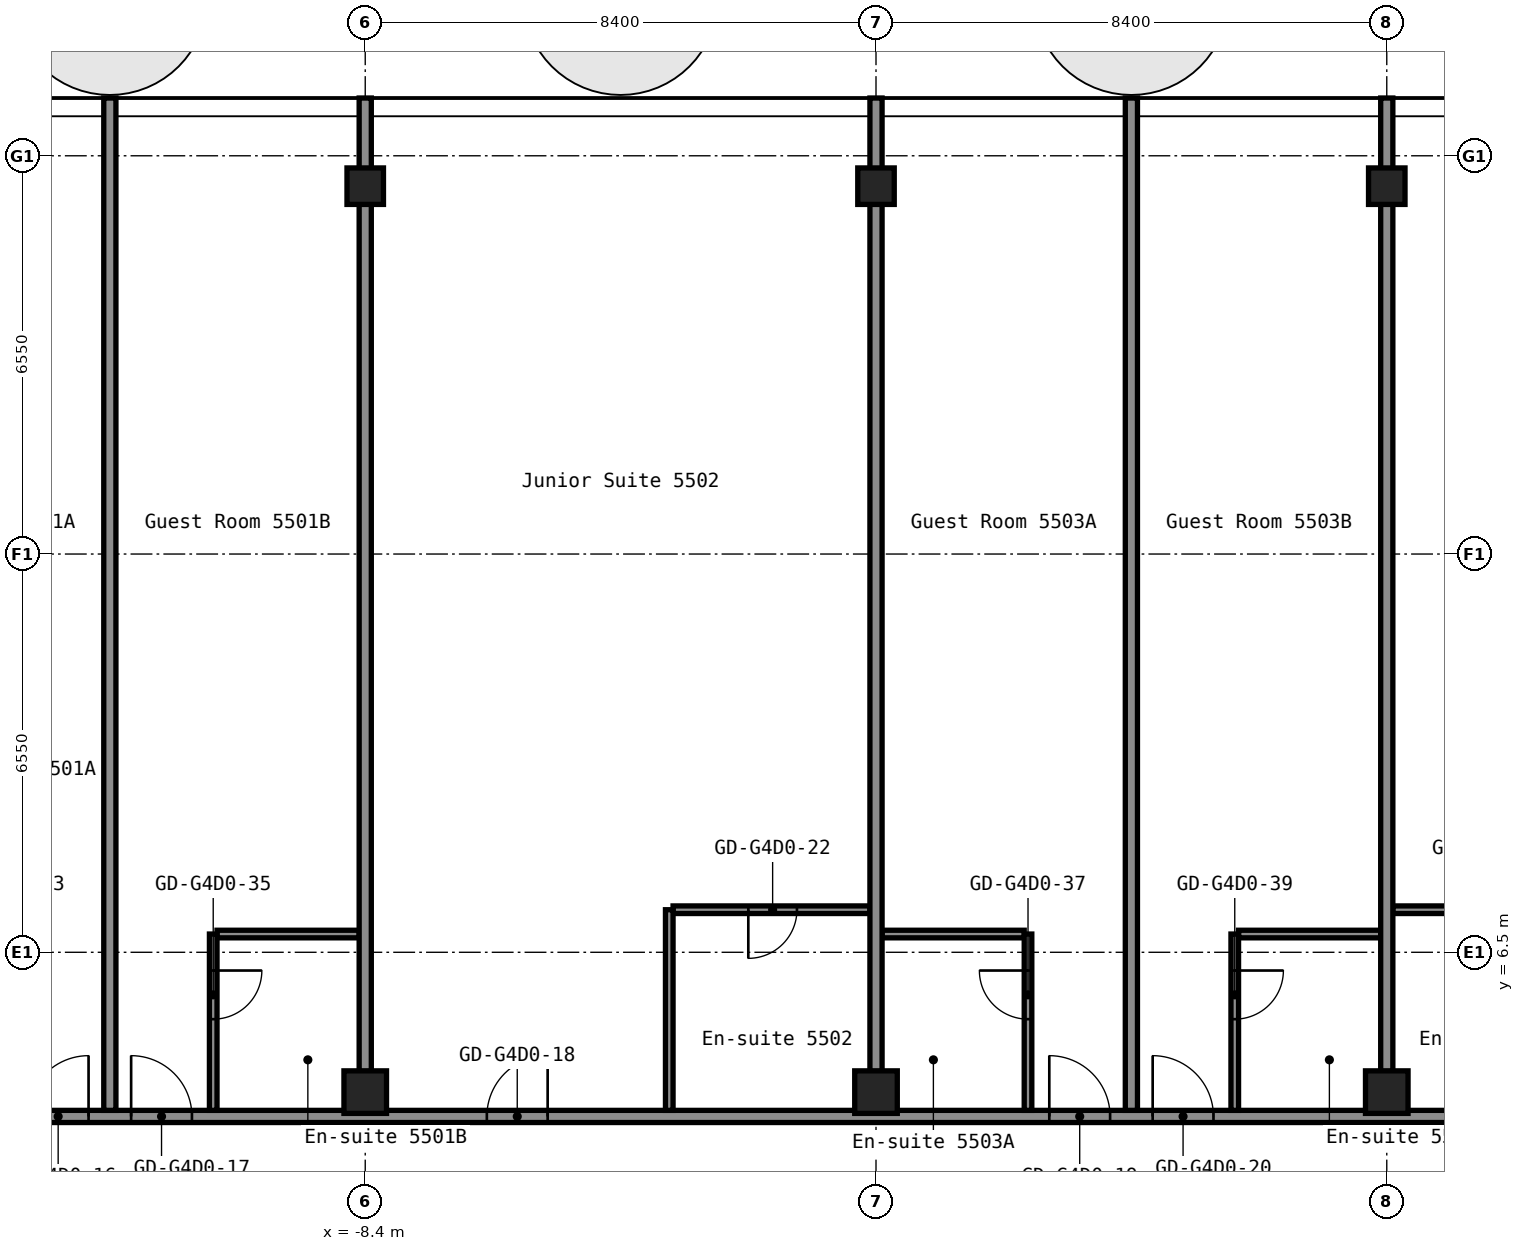
"""IFC4 building model, lengths in metres.
Left out: names, types, materials, properties, quantities, classifications, styles, units other than length and angle.
Written with IfcOpenShell. Run it as: python <this file> out.ifc"""

import sys

from ifc_helpers import new_model, si_unit, direction, frame, frame_2d, origin, origin_2d, place, context, subcontext, project, spatial, rectangle, hollow_rectangle, extrude, element, fill, save


model = new_model("IFC4")
c1 = context("Model", 3, precision=1e-05, world=origin(), true_north=direction((0.0, 1.0)))
c2 = subcontext(c1, "Body", "Model", "MODEL_VIEW")
j1 = project(units=[si_unit("LENGTHUNIT", "METRE"), si_unit("PLANEANGLEUNIT", "RADIAN")], contexts=[c1])
p1 = place(None, origin())
s1 = spatial("IfcSite", under=j1, at=p1, CompositionType="ELEMENT")
p2 = place(p1, origin())
s2 = spatial("IfcBuilding", under=s1, at=p2, CompositionType="ELEMENT")
p3 = place(p2, frame((0.0, 0.0, 196.2)))
s3 = spatial("IfcBuildingStorey", under=s2, at=p3, CompositionType="ELEMENT", Elevation=196.2)
p4 = place(p3, frame((-8.4, 4.2, 0.0), z_axis=(0.0, 0.0, 1.0), x_axis=(1.0, 0.0, 0.0)))
e1 = element("IfcColumn", 1, at=p4, inside=s3, PredefinedType="COLUMN", context=c2, shape_type="SweptSolid", body=[
    extrude(hollow_rectangle(XDim=0.7, YDim=0.7, WallThickness=0.028, at=origin_2d()), origin(), (0.0, 0.0, 1.0), 2.75),
])
p5 = place(p3, frame((-8.4, 19.1, 0.0), z_axis=(0.0, 0.0, 1.0), x_axis=(1.0, 0.0, 0.0)))
e2 = element("IfcColumn", 2, at=p5, inside=s3, PredefinedType="COLUMN", context=c2, shape_type="SweptSolid", body=[
    extrude(hollow_rectangle(XDim=0.6, YDim=0.6, WallThickness=0.025, InnerFilletRadius=0.038, OuterFilletRadius=0.062, at=origin_2d()), origin(), (0.0, 0.0, 1.0), 2.75),
])
p6 = place(p3, frame((0.0, 4.2, 0.0), z_axis=(0.0, 0.0, 1.0), x_axis=(1.0, 0.0, 0.0)))
e3 = element("IfcColumn", 3, at=p6, inside=s3, PredefinedType="COLUMN", context=c2, shape_type="SweptSolid", body=[
    extrude(hollow_rectangle(XDim=0.7, YDim=0.7, WallThickness=0.028, at=origin_2d()), origin(), (0.0, 0.0, 1.0), 2.75),
])
p7 = place(p3, frame((0.0, 19.1, 0.0), z_axis=(0.0, 0.0, 1.0), x_axis=(1.0, 0.0, 0.0)))
e4 = element("IfcColumn", 4, at=p7, inside=s3, PredefinedType="COLUMN", context=c2, shape_type="SweptSolid", body=[
    extrude(hollow_rectangle(XDim=0.6, YDim=0.6, WallThickness=0.025, InnerFilletRadius=0.038, OuterFilletRadius=0.062, at=origin_2d()), origin(), (0.0, 0.0, 1.0), 2.75),
])
p8 = place(p3, frame((8.4, 4.2, 0.0), z_axis=(0.0, 0.0, 1.0), x_axis=(1.0, 0.0, 0.0)))
e5 = element("IfcColumn", 5, at=p8, inside=s3, PredefinedType="COLUMN", context=c2, shape_type="SweptSolid", body=[
    extrude(hollow_rectangle(XDim=0.7, YDim=0.7, WallThickness=0.028, at=origin_2d()), origin(), (0.0, 0.0, 1.0), 2.75),
])
p9 = place(p3, frame((8.4, 19.1, 0.0), z_axis=(0.0, 0.0, 1.0), x_axis=(1.0, 0.0, 0.0)))
e6 = element("IfcColumn", 6, at=p9, inside=s3, PredefinedType="COLUMN", context=c2, shape_type="SweptSolid", body=[
    extrude(hollow_rectangle(XDim=0.6, YDim=0.6, WallThickness=0.025, InnerFilletRadius=0.038, OuterFilletRadius=0.062, at=origin_2d()), origin(), (0.0, 0.0, 1.0), 2.75),
])
p10 = place(p3, frame((-16.8, 3.8, 0.0), z_axis=(0.0, 0.0, 1.0), x_axis=(1.0, 0.0, 0.0)))
e7 = element("IfcWall", 7, at=p10, inside=s3, PredefinedType="PARTITIONING", context=c2, shape_type="SweptSolid", body=[
    extrude(rectangle(XDim=33.6, YDim=0.2, at=frame_2d((16.8, 0.0))), origin(), (0.0, 0.0, 1.0), 2.75),
])
p11 = place(p10, frame((2.85, 0.0, 0.0)))
e8 = element("IfcOpeningElement", 8, at=p11, cuts=e7, PredefinedType="OPENING", context=c2, shape_type="SweptSolid", body=[
    extrude(rectangle(XDim=1.0, YDim=2.1, at=frame_2d((0.5, 1.05))), frame((0.0, 0.11, 0.0), z_axis=(0.0, -1.0, 0.0), x_axis=(1.0, 0.0, 0.0)), (0.0, 0.0, 1.0), 0.22),
])
p12 = place(p10, frame((4.55, 0.0, 0.0)))
e9 = element("IfcOpeningElement", 9, at=p12, cuts=e7, PredefinedType="OPENING", context=c2, shape_type="SweptSolid", body=[
    extrude(rectangle(XDim=1.0, YDim=2.1, at=frame_2d((0.5, 1.05))), frame((0.0, 0.11, 0.0), z_axis=(0.0, -1.0, 0.0), x_axis=(1.0, 0.0, 0.0)), (0.0, 0.0, 1.0), 0.22),
])
p13 = place(p10, frame((10.4, 0.0, 0.0)))
e10 = element("IfcOpeningElement", 10, at=p13, cuts=e7, PredefinedType="OPENING", context=c2, shape_type="SweptSolid", body=[
    extrude(rectangle(XDim=1.0, YDim=2.1, at=frame_2d((0.5, 1.05))), frame((0.0, 0.11, 0.0), z_axis=(0.0, -1.0, 0.0), x_axis=(1.0, 0.0, 0.0)), (0.0, 0.0, 1.0), 0.22),
])
p14 = place(p10, frame((19.65, 0.0, 0.0)))
e11 = element("IfcOpeningElement", 11, at=p14, cuts=e7, PredefinedType="OPENING", context=c2, shape_type="SweptSolid", body=[
    extrude(rectangle(XDim=1.0, YDim=2.1, at=frame_2d((0.5, 1.05))), frame((0.0, 0.11, 0.0), z_axis=(0.0, -1.0, 0.0), x_axis=(1.0, 0.0, 0.0)), (0.0, 0.0, 1.0), 0.22),
])
p15 = place(p10, frame((21.35, 0.0, 0.0)))
e12 = element("IfcOpeningElement", 12, at=p15, cuts=e7, PredefinedType="OPENING", context=c2, shape_type="SweptSolid", body=[
    extrude(rectangle(XDim=1.0, YDim=2.1, at=frame_2d((0.5, 1.05))), frame((0.0, 0.11, 0.0), z_axis=(0.0, -1.0, 0.0), x_axis=(1.0, 0.0, 0.0)), (0.0, 0.0, 1.0), 0.22),
])
p16 = place(p10, frame((30.6, 0.0, 0.0)))
e13 = element("IfcOpeningElement", 13, at=p16, cuts=e7, PredefinedType="OPENING", context=c2, shape_type="SweptSolid", body=[
    extrude(rectangle(XDim=1.0, YDim=2.1, at=frame_2d((0.5, 1.05))), frame((0.0, 0.11, 0.0), z_axis=(0.0, -1.0, 0.0), x_axis=(1.0, 0.0, 0.0)), (0.0, 0.0, 1.0), 0.22),
])
for number, where, z_axis, x_axis in (
    (14, (-10.837, 6.8, 0.0), (0.0, 0.0, 1.0), (1.0, 0.0, 0.0)),
    (15, (0.1, 6.8, 0.0), (0.0, 0.0, 1.0), (1.0, 0.0, 0.0)),
):
    element("IfcWall", number, at=place(p3, frame(where, z_axis=z_axis, x_axis=x_axis)), inside=s3, PredefinedType="PARTITIONING", context=c2, shape_type="SweptSolid", body=[
        extrude(rectangle(XDim=2.337, YDim=0.125, at=frame_2d((1.169, 0.0))), origin(), (0.0, 0.0, 1.0), 2.75),
    ])
p17 = place(p3, frame((5.962, 6.8, 0.0), z_axis=(0.0, 0.0, 1.0), x_axis=(1.0, 0.0, 0.0)))
e16 = element("IfcWall", 16, at=p17, inside=s3, PredefinedType="PARTITIONING", context=c2, shape_type="SweptSolid", body=[
    extrude(rectangle(XDim=2.338, YDim=0.125, at=frame_2d((1.169, 0.0))), origin(), (0.0, 0.0, 1.0), 2.75),
])
p18 = place(p3, frame((-3.337, 7.2, 0.0), z_axis=(0.0, 0.0, 1.0), x_axis=(1.0, 0.0, 0.0)))
e17 = element("IfcWall", 17, at=p18, inside=s3, PredefinedType="PARTITIONING", context=c2, shape_type="SweptSolid", body=[
    extrude(rectangle(XDim=3.237, YDim=0.125, at=frame_2d((1.619, 0.0))), origin(), (0.0, 0.0, 1.0), 2.75),
])
p19 = place(p18, frame((1.238, 0.0, 0.0)))
e18 = element("IfcOpeningElement", 18, at=p19, cuts=e17, PredefinedType="OPENING", context=c2, shape_type="SweptSolid", body=[
    extrude(rectangle(XDim=0.8, YDim=2.1, at=frame_2d((0.4, 1.05))), frame((0.0, 0.073, 0.0), z_axis=(0.0, -1.0, 0.0), x_axis=(1.0, 0.0, 0.0)), (0.0, 0.0, 1.0), 0.145),
])
p20 = place(p3, frame((8.5, 7.2, 0.0), z_axis=(0.0, 0.0, 1.0), x_axis=(1.0, 0.0, 0.0)))
e19 = element("IfcWall", 19, at=p20, inside=s3, PredefinedType="PARTITIONING", context=c2, shape_type="SweptSolid", body=[
    extrude(rectangle(XDim=3.238, YDim=0.125, at=frame_2d((1.619, 0.0))), origin(), (0.0, 0.0, 1.0), 2.75),
])
p21 = place(p20, frame((1.2, 0.0, 0.0)))
e20 = element("IfcOpeningElement", 20, at=p21, cuts=e19, PredefinedType="OPENING", context=c2, shape_type="SweptSolid", body=[
    extrude(rectangle(XDim=0.8, YDim=2.1, at=frame_2d((0.4, 1.05))), frame((0.0, 0.073, 0.0), z_axis=(0.0, -1.0, 0.0), x_axis=(1.0, 0.0, 0.0)), (0.0, 0.0, 1.0), 0.145),
])
p22 = place(p3, frame((-12.6, 3.9, 0.0), z_axis=(0.0, 0.0, 1.0), x_axis=(0.0, 1.0, 0.0)))
e21 = element("IfcWall", 21, at=p22, inside=s3, PredefinedType="PARTITIONING", context=c2, shape_type="SweptSolid", body=[
    extrude(rectangle(XDim=16.65, YDim=0.2, at=frame_2d((8.325, 0.0))), origin(), (0.0, 0.0, 1.0), 2.75),
])
p23 = place(p3, frame((-10.9, 3.9, 0.0), z_axis=(0.0, 0.0, 1.0), x_axis=(0.0, 1.0, 0.0)))
e22 = element("IfcWall", 22, at=p23, inside=s3, PredefinedType="PARTITIONING", context=c2, shape_type="SweptSolid", body=[
    extrude(rectangle(XDim=2.9, YDim=0.125, at=frame_2d((1.45, 0.0))), origin(), (0.0, 0.0, 1.0), 2.75),
])
p24 = place(p23, frame((1.5, 0.0, 0.0)))
e23 = element("IfcOpeningElement", 23, at=p24, cuts=e22, PredefinedType="OPENING", context=c2, shape_type="SweptSolid", body=[
    extrude(rectangle(XDim=0.8, YDim=2.1, at=frame_2d((0.4, 1.05))), frame((0.0, 0.073, 0.0), z_axis=(0.0, -1.0, 0.0), x_axis=(1.0, 0.0, 0.0)), (0.0, 0.0, 1.0), 0.145),
])
p25 = place(p3, frame((-8.4, 4.54, 0.0), z_axis=(0.0, 0.0, 1.0), x_axis=(0.0, 1.0, 0.0)))
e24 = element("IfcWall", 24, at=p25, inside=s3, PredefinedType="PARTITIONING", context=c2, shape_type="SweptSolid", body=[
    extrude(rectangle(XDim=16.01, YDim=0.2, at=frame_2d((8.005, 0.0))), origin(), (0.0, 0.0, 1.0), 2.75),
])
p26 = place(p3, frame((-3.4, 3.9, 0.0), z_axis=(0.0, 0.0, 1.0), x_axis=(0.0, 1.0, 0.0)))
e25 = element("IfcWall", 25, at=p26, inside=s3, PredefinedType="PARTITIONING", context=c2, shape_type="SweptSolid", body=[
    extrude(rectangle(XDim=3.3, YDim=0.125, at=frame_2d((1.65, 0.0))), origin(), (0.0, 0.0, 1.0), 2.75),
])
p27 = place(p3, frame((0.0, 4.54, 0.0), z_axis=(0.0, 0.0, 1.0), x_axis=(0.0, 1.0, 0.0)))
e26 = element("IfcWall", 26, at=p27, inside=s3, PredefinedType="PARTITIONING", context=c2, shape_type="SweptSolid", body=[
    extrude(rectangle(XDim=16.01, YDim=0.2, at=frame_2d((8.005, 0.0))), origin(), (0.0, 0.0, 1.0), 2.75),
])
p28 = place(p3, frame((2.5, 3.9, 0.0), z_axis=(0.0, 0.0, 1.0), x_axis=(0.0, 1.0, 0.0)))
e27 = element("IfcWall", 27, at=p28, inside=s3, PredefinedType="PARTITIONING", context=c2, shape_type="SweptSolid", body=[
    extrude(rectangle(XDim=2.9, YDim=0.125, at=frame_2d((1.45, 0.0))), origin(), (0.0, 0.0, 1.0), 2.75),
])
p29 = place(p28, frame((1.5, 0.0, 0.0)))
e28 = element("IfcOpeningElement", 28, at=p29, cuts=e27, PredefinedType="OPENING", context=c2, shape_type="SweptSolid", body=[
    extrude(rectangle(XDim=0.8, YDim=2.1, at=frame_2d((0.4, 1.05))), frame((0.0, 0.073, 0.0), z_axis=(0.0, -1.0, 0.0), x_axis=(1.0, 0.0, 0.0)), (0.0, 0.0, 1.0), 0.145),
])
p30 = place(p3, frame((4.2, 3.9, 0.0), z_axis=(0.0, 0.0, 1.0), x_axis=(0.0, 1.0, 0.0)))
e29 = element("IfcWall", 29, at=p30, inside=s3, PredefinedType="PARTITIONING", context=c2, shape_type="SweptSolid", body=[
    extrude(rectangle(XDim=16.65, YDim=0.2, at=frame_2d((8.325, 0.0))), origin(), (0.0, 0.0, 1.0), 2.75),
])
p31 = place(p3, frame((5.9, 3.9, 0.0), z_axis=(0.0, 0.0, 1.0), x_axis=(0.0, 1.0, 0.0)))
e30 = element("IfcWall", 30, at=p31, inside=s3, PredefinedType="PARTITIONING", context=c2, shape_type="SweptSolid", body=[
    extrude(rectangle(XDim=2.9, YDim=0.125, at=frame_2d((1.45, 0.0))), origin(), (0.0, 0.0, 1.0), 2.75),
])
p32 = place(p31, frame((1.5, 0.0, 0.0)))
e31 = element("IfcOpeningElement", 31, at=p32, cuts=e30, PredefinedType="OPENING", context=c2, shape_type="SweptSolid", body=[
    extrude(rectangle(XDim=0.8, YDim=2.1, at=frame_2d((0.4, 1.05))), frame((0.0, 0.073, 0.0), z_axis=(0.0, -1.0, 0.0), x_axis=(1.0, 0.0, 0.0)), (0.0, 0.0, 1.0), 0.145),
])
p33 = place(p3, frame((8.4, 4.54, 0.0), z_axis=(0.0, 0.0, 1.0), x_axis=(0.0, 1.0, 0.0)))
e32 = element("IfcWall", 32, at=p33, inside=s3, PredefinedType="PARTITIONING", context=c2, shape_type="SweptSolid", body=[
    extrude(rectangle(XDim=16.01, YDim=0.2, at=frame_2d((8.005, 0.0))), origin(), (0.0, 0.0, 1.0), 2.75),
])
p34 = place(p11, origin())
e33 = element("IfcDoor", 33, at=p34, inside=s3, OperationType="SINGLE_SWING_LEFT", PredefinedType="DOOR", context=c2, shape_type="SweptSolid", body=[
    extrude(rectangle(XDim=1.0, YDim=2.1, at=frame_2d((0.5, 1.05))), frame((0.0, 0.025, 0.0), z_axis=(0.0, -1.0, 0.0), x_axis=(1.0, 0.0, 0.0)), (0.0, 0.0, 1.0), 0.05),
])
fill(e8, e33)
p35 = place(p12, origin())
e34 = element("IfcDoor", 34, at=p35, inside=s3, OperationType="SINGLE_SWING_RIGHT", PredefinedType="DOOR", context=c2, shape_type="SweptSolid", body=[
    extrude(rectangle(XDim=1.0, YDim=2.1, at=frame_2d((0.5, 1.05))), frame((0.0, 0.025, 0.0), z_axis=(0.0, -1.0, 0.0), x_axis=(1.0, 0.0, 0.0)), (0.0, 0.0, 1.0), 0.05),
])
fill(e9, e34)
p36 = place(p13, origin())
e35 = element("IfcDoor", 35, at=p36, inside=s3, OperationType="SINGLE_SWING_LEFT", PredefinedType="DOOR", context=c2, shape_type="SweptSolid", body=[
    extrude(rectangle(XDim=1.0, YDim=2.1, at=frame_2d((0.5, 1.05))), frame((0.0, 0.025, 0.0), z_axis=(0.0, -1.0, 0.0), x_axis=(1.0, 0.0, 0.0)), (0.0, 0.0, 1.0), 0.05),
])
fill(e10, e35)
p37 = place(p14, origin())
e36 = element("IfcDoor", 36, at=p37, inside=s3, OperationType="SINGLE_SWING_RIGHT", PredefinedType="DOOR", context=c2, shape_type="SweptSolid", body=[
    extrude(rectangle(XDim=1.0, YDim=2.1, at=frame_2d((0.5, 1.05))), frame((0.0, 0.025, 0.0), z_axis=(0.0, -1.0, 0.0), x_axis=(1.0, 0.0, 0.0)), (0.0, 0.0, 1.0), 0.05),
])
fill(e11, e36)
p38 = place(p15, origin())
e37 = element("IfcDoor", 37, at=p38, inside=s3, OperationType="SINGLE_SWING_RIGHT", PredefinedType="DOOR", context=c2, shape_type="SweptSolid", body=[
    extrude(rectangle(XDim=1.0, YDim=2.1, at=frame_2d((0.5, 1.05))), frame((0.0, 0.025, 0.0), z_axis=(0.0, -1.0, 0.0), x_axis=(1.0, 0.0, 0.0)), (0.0, 0.0, 1.0), 0.05),
])
fill(e12, e37)
p39 = place(p19, origin())
e38 = element("IfcDoor", 38, at=p39, inside=s3, OperationType="SINGLE_SWING_LEFT", PredefinedType="DOOR", context=c2, shape_type="SweptSolid", body=[
    extrude(rectangle(XDim=0.8, YDim=2.1, at=frame_2d((0.4, 1.05))), frame((0.0, 0.025, 0.0), z_axis=(0.0, -1.0, 0.0), x_axis=(1.0, 0.0, 0.0)), (0.0, 0.0, 1.0), 0.05),
])
fill(e18, e38)
p40 = place(p24, origin())
e39 = element("IfcDoor", 39, at=p40, inside=s3, OperationType="SINGLE_SWING_RIGHT", PredefinedType="DOOR", context=c2, shape_type="SweptSolid", body=[
    extrude(rectangle(XDim=0.8, YDim=2.1, at=frame_2d((0.4, 1.05))), frame((0.0, 0.025, 0.0), z_axis=(0.0, -1.0, 0.0), x_axis=(1.0, 0.0, 0.0)), (0.0, 0.0, 1.0), 0.05),
])
fill(e23, e39)
p41 = place(p29, origin())
e40 = element("IfcDoor", 40, at=p41, inside=s3, OperationType="SINGLE_SWING_LEFT", PredefinedType="DOOR", context=c2, shape_type="SweptSolid", body=[
    extrude(rectangle(XDim=0.8, YDim=2.1, at=frame_2d((0.4, 1.05))), frame((0.0, 0.025, 0.0), z_axis=(0.0, -1.0, 0.0), x_axis=(1.0, 0.0, 0.0)), (0.0, 0.0, 1.0), 0.05),
])
fill(e28, e40)
p42 = place(p32, origin())
e41 = element("IfcDoor", 41, at=p42, inside=s3, OperationType="SINGLE_SWING_RIGHT", PredefinedType="DOOR", context=c2, shape_type="SweptSolid", body=[
    extrude(rectangle(XDim=0.8, YDim=2.1, at=frame_2d((0.4, 1.05))), frame((0.0, 0.025, 0.0), z_axis=(0.0, -1.0, 0.0), x_axis=(1.0, 0.0, 0.0)), (0.0, 0.0, 1.0), 0.05),
])
fill(e31, e41)
save(model, sys.argv[1])
